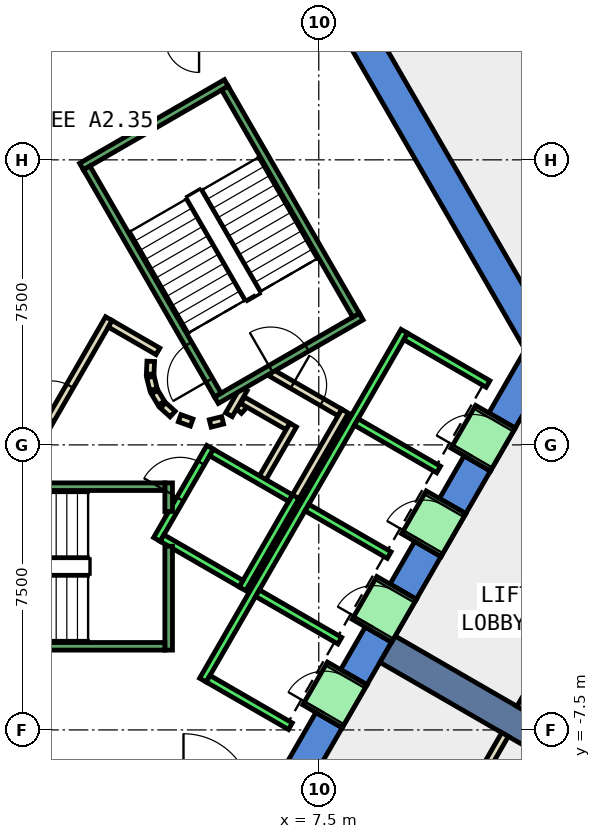
"""IFC4 building model, lengths in metres.
Left out: names, types, materials, properties, quantities, classifications, styles, units other than length and angle.
Written with IfcOpenShell. Run it as: python <this file> out.ifc"""

import sys

from ifc_helpers import new_model, si_unit, direction, frame, frame_2d, origin, place, context, subcontext, project, spatial, polyline, rectangle, outline, extrude, element, fill, save


model = new_model("IFC4")
c1 = context("Model", 3, precision=1e-05, world=origin(), true_north=direction((0.0, 1.0)))
c2 = subcontext(c1, "Body", "Model", "MODEL_VIEW")
j1 = project(units=[si_unit("LENGTHUNIT", "METRE"), si_unit("PLANEANGLEUNIT", "RADIAN")], contexts=[c1])
p1 = place(None, origin())
s1 = spatial("IfcSite", under=j1, at=p1, CompositionType="ELEMENT")
p2 = place(p1, origin())
s2 = spatial("IfcBuilding", under=s1, at=p2, CompositionType="ELEMENT")
p3 = place(p2, frame((0.0, 0.0, 171.8)))
s3 = spatial("IfcBuildingStorey", under=s2, at=p3, CompositionType="ELEMENT", Elevation=171.8)
p4 = place(p3, frame((0.0, 0.0, -0.4)))
e1 = element("IfcWall", 1, at=p4, inside=s3, PredefinedType="SHEAR", context=c2, shape_type="SweptSolid", body=[
    extrude(outline(polyline([(8.517, 11.748), (7.824, 11.348), (12.933, 2.5), (13.856, 2.5), (8.517, 11.748)])), origin(), (0.0, 0.0, 1.0), 4.2),
])
p5 = place(p3, frame((0.0, 0.0, -0.4)))
e2 = element("IfcWall", 2, at=p5, inside=s3, PredefinedType="SHEAR", context=c2, shape_type="SweptSolid", body=[
    extrude(outline(polyline([(8.117, -7.44), (7.424, -7.04), (6.466, -8.7), (6.928, -9.5), (8.117, -7.44)])), origin(), (0.0, 0.0, 1.0), 4.2),
])
p6 = place(p3, frame((0.0, 0.0, -0.4)))
e3 = element("IfcWall", 3, at=p6, inside=s3, PredefinedType="SHEAR", context=c2, shape_type="SweptSolid", body=[
    extrude(outline(polyline([(9.417, -5.189), (8.724, -4.789), (8.075, -5.914), (8.767, -6.314), (9.417, -5.189)])), origin(), (0.0, 0.0, 1.0), 4.2),
])
p7 = place(p3, frame((0.0, 0.0, -0.4)))
e4 = element("IfcWall", 4, at=p7, inside=s3, PredefinedType="SHEAR", context=c2, shape_type="SweptSolid", body=[
    extrude(outline(polyline([(10.717, -2.937), (10.025, -2.537), (9.374, -3.663), (10.067, -4.063), (10.717, -2.937)])), origin(), (0.0, 0.0, 1.0), 4.2),
])
p8 = place(p3, frame((0.0, 0.0, -0.4)))
e5 = element("IfcWall", 5, at=p8, inside=s3, PredefinedType="SHEAR", context=c2, shape_type="SweptSolid", body=[
    extrude(outline(polyline([(12.017, -0.686), (11.324, -0.286), (10.675, -1.411), (11.367, -1.811), (12.017, -0.686)])), origin(), (0.0, 0.0, 1.0), 4.2),
])
p9 = place(p3, frame((0.0, 0.0, -0.4)))
e6 = element("IfcWall", 6, at=p9, inside=s3, PredefinedType="SHEAR", context=c2, shape_type="SweptSolid", body=[
    extrude(outline(polyline([(11.974, 0.84), (12.667, 0.44), (13.856, 2.5), (12.933, 2.5), (11.974, 0.84)])), origin(), (0.0, 0.0, 1.0), 4.2),
])
p10 = place(p3, frame((0.0, 0.0, 3.6)))
e7 = element("IfcWall", 7, at=p10, inside=s3, PredefinedType="SHEAR", context=c2, shape_type="SweptSolid", body=[
    extrude(outline(polyline([(8.767, -6.314), (8.075, -5.914), (7.424, -7.04), (8.117, -7.44), (8.767, -6.314)])), origin(), (0.0, 0.0, 1.0), 0.2),
])
p11 = place(p3, frame((0.0, 0.0, 3.6)))
e8 = element("IfcWall", 8, at=p11, inside=s3, PredefinedType="SHEAR", context=c2, shape_type="SweptSolid", body=[
    extrude(outline(polyline([(10.067, -4.063), (9.374, -3.663), (8.724, -4.789), (9.417, -5.189), (10.067, -4.063)])), origin(), (0.0, 0.0, 1.0), 0.2),
])
p12 = place(p3, frame((0.0, 0.0, 3.6)))
e9 = element("IfcWall", 9, at=p12, inside=s3, PredefinedType="SHEAR", context=c2, shape_type="SweptSolid", body=[
    extrude(outline(polyline([(11.367, -1.811), (10.675, -1.411), (10.025, -2.537), (10.717, -2.937), (11.367, -1.811)])), origin(), (0.0, 0.0, 1.0), 0.2),
])
p13 = place(p3, frame((0.0, 0.0, 3.6)))
e10 = element("IfcWall", 10, at=p13, inside=s3, PredefinedType="SHEAR", context=c2, shape_type="SweptSolid", body=[
    extrude(outline(polyline([(12.667, 0.44), (11.974, 0.84), (11.324, -0.286), (12.017, -0.686), (12.667, 0.44)])), origin(), (0.0, 0.0, 1.0), 0.2),
])
p14 = place(p3, frame((9.31, -5.375, -0.4), z_axis=(0.0, 0.0, 1.0), x_axis=(0.866017533419, -0.500013631625, 0.0)))
e11 = element("IfcWall", 11, at=p14, inside=s3, PredefinedType="SHEAR", context=c2, shape_type="SweptSolid", body=[
    extrude(rectangle(XDim=9.0, YDim=0.8, at=frame_2d((4.5, 0.0))), origin(), (0.0, 0.0, 1.0), 4.2),
])
p15 = place(p3, frame((5.39, 0.898, 0.0), z_axis=(0.0, 0.0, 1.0), x_axis=(0.673828488714, 0.738887791073, 0.0)))
e12 = element("IfcWall", 12, at=p15, inside=s3, PredefinedType="PARTITIONING", context=c2, shape_type="SweptSolid", body=[
    extrude(rectangle(XDim=0.263, YDim=0.2, at=frame_2d((0.131, 0.0))), origin(), (0.0, 0.0, 1.0), 3.8),
])
p16 = place(p3, frame((5.499, 1.172, 0.0), z_axis=(0.0, 0.0, 1.0), x_axis=(0.866333505267, -0.499465972466, 0.0)))
e13 = element("IfcWall", 13, at=p16, inside=s3, PredefinedType="PARTITIONING", context=c2, shape_type="SweptSolid", body=[
    extrude(rectangle(XDim=1.374, YDim=0.2, at=frame_2d((0.687, 0.0))), origin(), (0.0, 0.0, 1.0), 3.8),
])
p17 = place(p3, frame((6.826, 0.522, 0.0), z_axis=(0.0, 0.0, 1.0), x_axis=(-0.500016722714, -0.866015748706, 0.0)))
e14 = element("IfcWall", 14, at=p17, inside=s3, PredefinedType="PARTITIONING", context=c2, shape_type="SweptSolid", body=[
    extrude(rectangle(XDim=1.7, YDim=0.2, at=frame_2d((0.85, 0.0))), origin(), (0.0, 0.0, 1.0), 3.8),
])
p18 = place(p3, frame((6.25, 1.894, 0.0), z_axis=(0.0, 0.0, 1.0), x_axis=(0.866043184279, -0.499969202016, 0.0)))
e15 = element("IfcWall", 15, at=p18, inside=s3, PredefinedType="PARTITIONING", context=c2, shape_type="SweptSolid", body=[
    extrude(rectangle(XDim=2.084, YDim=0.2, at=frame_2d((1.042, 0.0))), origin(), (0.0, 0.0, 1.0), 3.8),
])
p19 = place(p18, frame((0.642, 0.0, 0.0)))
e16 = element("IfcOpeningElement", 16, at=p19, cuts=e15, PredefinedType="OPENING", context=c2, shape_type="SweptSolid", body=[
    extrude(rectangle(XDim=0.9, YDim=2.1, at=frame_2d((0.45, 1.05))), frame((0.0, 0.11, 0.0), z_axis=(0.0, -1.0, 0.0), x_axis=(1.0, 0.0, 0.0)), (0.0, 0.0, 1.0), 0.22),
])
p20 = place(p3, frame((8.192, 0.888, 0.0), z_axis=(0.0, 0.0, 1.0), x_axis=(-0.499940625693, -0.866059680843, 0.0)))
e17 = element("IfcWall", 17, at=p20, inside=s3, PredefinedType="PARTITIONING", context=c2, shape_type="SweptSolid", body=[
    extrude(rectangle(XDim=2.68, YDim=0.2, at=frame_2d((1.34, 0.0))), origin(), (0.0, 0.0, 1.0), 3.8),
])
p21 = place(p3, frame((5.135, 0.793, 0.0), z_axis=(0.0, 0.0, 1.0), x_axis=(0.499526442893, 0.866298639529, 0.0)))
e18 = element("IfcWall", 18, at=p21, inside=s3, PredefinedType="PARTITIONING", context=c2, shape_type="SweptSolid", body=[
    extrude(rectangle(XDim=0.791, YDim=0.2, at=frame_2d((0.396, 0.0))), origin(), (0.0, 0.0, 1.0), 3.8),
])
p22 = place(p3, frame((-0.52, -1.0, 0.0), z_axis=(0.0, 0.0, 1.0), x_axis=(0.50011622646, 0.865958290007, 0.0)))
e19 = element("IfcWall", 19, at=p22, inside=s3, PredefinedType="PARTITIONING", context=c2, shape_type="SweptSolid", body=[
    extrude(rectangle(XDim=4.991, YDim=0.2, at=frame_2d((2.496, 0.0))), origin(), (0.0, 0.0, 1.0), 3.8),
])
p23 = place(p22, frame((1.945, 0.0, 0.0)))
e20 = element("IfcOpeningElement", 20, at=p23, cuts=e19, PredefinedType="OPENING", context=c2, shape_type="SweptSolid", body=[
    extrude(rectangle(XDim=1.0, YDim=2.1, at=frame_2d((0.5, 1.05))), frame((0.0, 0.11, 0.0), z_axis=(0.0, -1.0, 0.0), x_axis=(1.0, 0.0, 0.0)), (0.0, 0.0, 1.0), 0.22),
])
p24 = place(p3, frame((2.012, 3.186, 0.0), z_axis=(0.0, 0.0, 1.0), x_axis=(0.865891012941, -0.500232699559, 0.0)))
e21 = element("IfcWall", 21, at=p24, inside=s3, PredefinedType="PARTITIONING", context=c2, shape_type="SweptSolid", body=[
    extrude(rectangle(XDim=1.449, YDim=0.2, at=frame_2d((0.725, 0.0))), origin(), (0.0, 0.0, 1.0), 3.8),
])
p25 = place(p3, frame((3.079, 2.199, 0.0), z_axis=(0.0, 0.0, 1.0), x_axis=(-0.047771483479, -0.998858290933, 0.0)))
e22 = element("IfcWall", 22, at=p25, inside=s3, PredefinedType="PARTITIONING", context=c2, shape_type="SweptSolid", body=[
    extrude(rectangle(XDim=0.337, YDim=0.2, at=frame_2d((0.169, 0.0))), origin(), (0.0, 0.0, 1.0), 3.8),
])
p26 = place(p3, frame((3.07, 1.786, 0.0), z_axis=(0.0, 0.0, 1.0), x_axis=(0.242705583207, -0.970099994784, 0.0)))
e23 = element("IfcWall", 23, at=p26, inside=s3, PredefinedType="PARTITIONING", context=c2, shape_type="SweptSolid", body=[
    extrude(rectangle(XDim=0.338, YDim=0.2, at=frame_2d((0.169, 0.0))), origin(), (0.0, 0.0, 1.0), 3.8),
])
for number, where, z_axis, x_axis in (
    (24, (3.182, 1.388, 0.0), (0.0, 0.0, 1.0), (0.512, -0.859, 0.0)),
    (25, (3.404, 1.039, 0.0), (0.0, 0.0, 1.0), (0.74, -0.672, 0.0)),
):
    element("IfcWall", number, at=place(p3, frame(where, z_axis=z_axis, x_axis=x_axis)), inside=s3, PredefinedType="PARTITIONING", context=c2, shape_type="SweptSolid", body=[
        extrude(rectangle(XDim=0.338, YDim=0.2, at=frame_2d((0.169, 0.0))), origin(), (0.0, 0.0, 1.0), 3.8),
    ])
p27 = place(p3, frame((3.838, 0.702, 0.0), z_axis=(0.0, 0.0, 1.0), x_axis=(0.941035081519, -0.338308993895, 0.0)))
e26 = element("IfcWall", 26, at=p27, inside=s3, PredefinedType="PARTITIONING", context=c2, shape_type="SweptSolid", body=[
    extrude(rectangle(XDim=0.337, YDim=0.2, at=frame_2d((0.168, 0.0))), origin(), (0.0, 0.0, 1.0), 3.8),
])
p28 = place(p3, frame((4.644, 0.564, 0.0), z_axis=(0.0, 0.0, 1.0), x_axis=(0.969929076366, 0.243387729394, 0.0)))
e27 = element("IfcWall", 27, at=p28, inside=s3, PredefinedType="PARTITIONING", context=c2, shape_type="SweptSolid", body=[
    extrude(rectangle(XDim=0.337, YDim=0.2, at=frame_2d((0.168, 0.0))), origin(), (0.0, 0.0, 1.0), 3.8),
])
p29 = place(p3, frame((18.0, 2.077, 0.0), z_axis=(0.0, 0.0, 1.0), x_axis=(-0.499959557847, -0.866048751813, 0.0)))
e28 = element("IfcWall", 28, at=p29, inside=s3, PredefinedType="PARTITIONING", context=c2, shape_type="SweptSolid", body=[
    extrude(rectangle(XDim=10.399, YDim=0.2, at=frame_2d((5.199, 0.0))), origin(), (0.0, 0.0, 1.0), 3.8),
])
p30 = place(p3, frame((12.401, -7.621, 0.0), z_axis=(0.0, 0.0, 1.0), x_axis=(-0.499983724212, -0.866034800411, 0.0)))
e29 = element("IfcWall", 29, at=p30, inside=s3, PredefinedType="PARTITIONING", context=c2, shape_type="SweptSolid", body=[
    extrude(rectangle(XDim=9.302, YDim=0.2, at=frame_2d((4.651, 0.0))), origin(), (0.0, 0.0, 1.0), 3.8),
])
p31 = place(p3, frame((3.24, -2.488, 0.0), z_axis=(0.0, 0.0, 1.0), x_axis=(0.49994636267, 0.866056369097, 0.0)))
e30 = element("IfcWall", 30, at=p31, inside=s3, PredefinedType="STANDARD", context=c2, shape_type="SweptSolid", body=[
    extrude(rectangle(XDim=2.8, YDim=0.2, at=frame_2d((1.4, 0.0))), origin(), (0.0, 0.0, 1.0), 3.8),
])
p32 = place(p31, frame((1.225, 0.0, 0.0)))
e31 = element("IfcOpeningElement", 31, at=p32, cuts=e30, PredefinedType="OPENING", context=c2, shape_type="SweptSolid", body=[
    extrude(rectangle(XDim=1.1, YDim=2.1, at=frame_2d((0.55, 1.05))), frame((0.0, 0.11, 0.0), z_axis=(0.0, -1.0, 0.0), x_axis=(1.0, 0.0, 0.0)), (0.0, 0.0, 1.0), 0.22),
])
p33 = place(p3, frame((5.492, -3.788, 0.0), z_axis=(0.0, 0.0, 1.0), x_axis=(0.500011755427, 0.866018616679, 0.0)))
e32 = element("IfcWall", 32, at=p33, inside=s3, PredefinedType="STANDARD", context=c2, shape_type="SweptSolid", body=[
    extrude(rectangle(XDim=2.8, YDim=0.2, at=frame_2d((1.4, 0.0))), origin(), (0.0, 0.0, 1.0), 3.8),
])
p34 = place(p3, frame((3.377, -2.452, 0.0), z_axis=(0.0, 0.0, 1.0), x_axis=(0.865955154139, -0.50012165622, 0.0)))
e33 = element("IfcWall", 33, at=p34, inside=s3, PredefinedType="STANDARD", context=c2, shape_type="SweptSolid", body=[
    extrude(rectangle(XDim=2.4, YDim=0.2, at=frame_2d((1.2, 0.0))), origin(), (0.0, 0.0, 1.0), 3.8),
])
p35 = place(p3, frame((4.677, -0.2, 0.0), z_axis=(0.0, 0.0, 1.0), x_axis=(0.865973769406, -0.500089422704, 0.0)))
e34 = element("IfcWall", 34, at=p35, inside=s3, PredefinedType="STANDARD", context=c2, shape_type="SweptSolid", body=[
    extrude(rectangle(XDim=2.399, YDim=0.2, at=frame_2d((1.2, 0.0))), origin(), (0.0, 0.0, 1.0), 3.8),
])
p36 = place(p3, frame((4.451, -6.19, 0.0), z_axis=(0.0, 0.0, 1.0), x_axis=(0.50000090737, 0.866024879913, 0.0)))
e35 = element("IfcWall", 35, at=p36, inside=s3, PredefinedType="STANDARD", context=c2, shape_type="SweptSolid", body=[
    extrude(rectangle(XDim=10.6, YDim=0.2, at=frame_2d((5.3, 0.0))), origin(), (0.0, 0.0, 1.0), 3.8),
])
for number, where, z_axis, x_axis in (
    (36, (4.588, -6.153, 0.0), (0.0, 0.0, 1.0), (0.866, -0.5, 0.0)),
    (37, (5.888, -3.902, 0.0), (0.0, 0.0, 1.0), (0.866, -0.5, 0.0)),
    (38, (7.188, -1.65, 0.0), (0.0, 0.0, 1.0), (0.866, -0.5, 0.0)),
    (39, (8.488, 0.602, 0.0), (0.0, 0.0, 1.0), (0.866, -0.5, 0.0)),
):
    element("IfcWall", number, at=place(p3, frame(where, z_axis=z_axis, x_axis=x_axis)), inside=s3, PredefinedType="STANDARD", context=c2, shape_type="SweptSolid", body=[
        extrude(rectangle(XDim=2.5, YDim=0.2, at=frame_2d((1.25, 0.0))), origin(), (0.0, 0.0, 1.0), 3.8),
    ])
p37 = place(p3, frame((9.788, 2.853, 0.0), z_axis=(0.0, 0.0, 1.0), x_axis=(0.865998541277, -0.500046524342, 0.0)))
e40 = element("IfcWall", 40, at=p37, inside=s3, PredefinedType="STANDARD", context=c2, shape_type="SweptSolid", body=[
    extrude(rectangle(XDim=2.5, YDim=0.2, at=frame_2d((1.25, 0.0))), origin(), (0.0, 0.0, 1.0), 3.8),
])
p38 = place(p3, frame((7.598, -7.14, 0.0), z_axis=(0.0, 0.0, 1.0), x_axis=(0.500362116554, 0.865816234728, 0.0)))
e41 = element("IfcWall", 41, at=p38, inside=s3, PredefinedType="STANDARD", context=c2, shape_type="SweptSolid", body=[
    extrude(rectangle(XDim=1.299, YDim=1.2, at=frame_2d((0.65, 0.0))), origin(), (0.0, 0.0, 1.0), 2.4),
])
p39 = place(p38, frame((0.1, 0.0, 0.0)))
e42 = element("IfcOpeningElement", 42, at=p39, cuts=e41, PredefinedType="OPENING", context=c2, shape_type="SweptSolid", body=[
    extrude(rectangle(XDim=1.1, YDim=2.3, at=frame_2d((0.55, 1.15))), frame((0.0, 0.61, 0.0), z_axis=(0.0, -1.0, 0.0), x_axis=(1.0, 0.0, 0.0)), (0.0, 0.0, 1.0), 1.22),
])
p40 = place(p3, frame((8.898, -4.889, 0.0), z_axis=(0.0, 0.0, 1.0), x_axis=(0.500036693733, 0.866004217611, 0.0)))
e43 = element("IfcWall", 43, at=p40, inside=s3, PredefinedType="STANDARD", context=c2, shape_type="SweptSolid", body=[
    extrude(rectangle(XDim=1.3, YDim=1.2, at=frame_2d((0.65, 0.0))), origin(), (0.0, 0.0, 1.0), 2.4),
])
p41 = place(p40, frame((0.1, 0.0, 0.0)))
e44 = element("IfcOpeningElement", 44, at=p41, cuts=e43, PredefinedType="OPENING", context=c2, shape_type="SweptSolid", body=[
    extrude(rectangle(XDim=1.1, YDim=2.3, at=frame_2d((0.55, 1.15))), frame((0.0, 0.61, 0.0), z_axis=(0.0, -1.0, 0.0), x_axis=(1.0, 0.0, 0.0)), (0.0, 0.0, 1.0), 1.22),
])
p42 = place(p3, frame((10.198, -2.637, 0.0), z_axis=(0.0, 0.0, 1.0), x_axis=(0.49989585183, 0.866085525409, 0.0)))
e45 = element("IfcWall", 45, at=p42, inside=s3, PredefinedType="STANDARD", context=c2, shape_type="SweptSolid", body=[
    extrude(rectangle(XDim=1.3, YDim=1.2, at=frame_2d((0.65, 0.0))), origin(), (0.0, 0.0, 1.0), 2.4),
])
p43 = place(p42, frame((0.1, 0.0, 0.0)))
e46 = element("IfcOpeningElement", 46, at=p43, cuts=e45, PredefinedType="OPENING", context=c2, shape_type="SweptSolid", body=[
    extrude(rectangle(XDim=1.1, YDim=2.3, at=frame_2d((0.55, 1.15))), frame((0.0, 0.61, 0.0), z_axis=(0.0, -1.0, 0.0), x_axis=(1.0, 0.0, 0.0)), (0.0, 0.0, 1.0), 1.22),
])
p44 = place(p3, frame((11.498, -0.385, 0.0), z_axis=(0.0, 0.0, 1.0), x_axis=(0.500221244143, 0.865897630733, 0.0)))
e47 = element("IfcWall", 47, at=p44, inside=s3, PredefinedType="STANDARD", context=c2, shape_type="SweptSolid", body=[
    extrude(rectangle(XDim=1.299, YDim=1.2, at=frame_2d((0.65, 0.0))), origin(), (0.0, 0.0, 1.0), 2.4),
])
p45 = place(p44, frame((0.1, 0.0, 0.0)))
e48 = element("IfcOpeningElement", 48, at=p45, cuts=e47, PredefinedType="OPENING", context=c2, shape_type="SweptSolid", body=[
    extrude(rectangle(XDim=1.1, YDim=2.3, at=frame_2d((0.55, 1.15))), frame((0.0, 0.61, 0.0), z_axis=(0.0, -1.0, 0.0), x_axis=(1.0, 0.0, 0.0)), (0.0, 0.0, 1.0), 1.22),
])
p46 = place(p3, frame((3.55, -2.667, 0.0), z_axis=(0.0, 0.0, 1.0), x_axis=(0.0, -1.0, 0.0)))
e49 = element("IfcWall", 49, at=p46, inside=s3, PredefinedType="STANDARD", context=c2, shape_type="SweptSolid", body=[
    extrude(rectangle(XDim=2.733, YDim=0.2, at=frame_2d((1.366, 0.0))), origin(), (0.0, 0.0, 1.0), 3.8),
])
p47 = place(p3, frame((3.55, -1.0, 0.0), z_axis=(0.0, 0.0, 1.0), x_axis=(0.0, -1.0, 0.0)))
e50 = element("IfcWall", 50, at=p47, inside=s3, PredefinedType="STANDARD", context=c2, shape_type="SweptSolid", body=[
    extrude(rectangle(XDim=0.751, YDim=0.2, at=frame_2d((0.375, 0.0))), origin(), (0.0, 0.0, 1.0), 3.8),
])
p48 = place(p3, frame((-3.45, -1.1, 0.0), z_axis=(0.0, 0.0, 1.0), x_axis=(1.0, 0.0, 0.0)))
e51 = element("IfcWall", 51, at=p48, inside=s3, PredefinedType="STANDARD", context=c2, shape_type="SweptSolid", body=[
    extrude(rectangle(XDim=6.9, YDim=0.2, at=frame_2d((3.45, 0.0))), origin(), (0.0, 0.0, 1.0), 3.8),
])
p49 = place(p48, frame((0.45, 0.0, 0.0)))
e52 = element("IfcOpeningElement", 52, at=p49, cuts=e51, PredefinedType="OPENING", context=c2, shape_type="SweptSolid", body=[
    extrude(rectangle(XDim=1.1, YDim=2.2, at=frame_2d((0.55, 1.1))), frame((0.0, 0.11, 0.0), z_axis=(0.0, -1.0, 0.0), x_axis=(1.0, 0.0, 0.0)), (0.0, 0.0, 1.0), 0.22),
])
p50 = place(p3, frame((-3.45, -5.3, 0.0), z_axis=(0.0, 0.0, 1.0), x_axis=(1.0, 0.0, 0.0)))
e53 = element("IfcWall", 53, at=p50, inside=s3, PredefinedType="STANDARD", context=c2, shape_type="SweptSolid", body=[
    extrude(rectangle(XDim=6.9, YDim=0.2, at=frame_2d((3.45, 0.0))), origin(), (0.0, 0.0, 1.0), 3.8),
])
p51 = place(p3, frame((4.806, 1.176, 0.0), z_axis=(0.0, 0.0, 1.0), x_axis=(0.866059941101, 0.499940174841, 0.0)))
e54 = element("IfcWall", 54, at=p51, inside=s3, PredefinedType="STANDARD", context=c2, shape_type="SweptSolid", body=[
    extrude(rectangle(XDim=4.4, YDim=0.2, at=frame_2d((2.2, 0.0))), origin(), (0.0, 0.0, 1.0), 3.8),
])
p52 = place(p51, frame((1.65, 0.0, 0.0)))
e55 = element("IfcOpeningElement", 55, at=p52, cuts=e54, PredefinedType="OPENING", context=c2, shape_type="SweptSolid", body=[
    extrude(rectangle(XDim=1.1, YDim=2.2, at=frame_2d((0.55, 1.1))), frame((0.0, 0.11, 0.0), z_axis=(0.0, -1.0, 0.0), x_axis=(1.0, 0.0, 0.0)), (0.0, 0.0, 1.0), 0.22),
])
p53 = place(p3, frame((1.256, 7.324, 0.0), z_axis=(0.0, 0.0, 1.0), x_axis=(0.866046073146, 0.499964197906, 0.0)))
e56 = element("IfcWall", 56, at=p53, inside=s3, PredefinedType="STANDARD", context=c2, shape_type="SweptSolid", body=[
    extrude(rectangle(XDim=4.4, YDim=0.2, at=frame_2d((2.2, 0.0))), origin(), (0.0, 0.0, 1.0), 3.8),
])
p54 = place(p3, frame((4.843, 1.312, 0.0), z_axis=(0.0, 0.0, 1.0), x_axis=(-0.499963383562, 0.866046543262, 0.0)))
e57 = element("IfcWall", 57, at=p54, inside=s3, PredefinedType="STANDARD", context=c2, shape_type="SweptSolid", body=[
    extrude(rectangle(XDim=6.9, YDim=0.2, at=frame_2d((3.45, 0.0))), origin(), (0.0, 0.0, 1.0), 3.8),
])
p55 = place(p54, frame((0.45, 0.0, 0.0)))
e58 = element("IfcOpeningElement", 58, at=p55, cuts=e57, PredefinedType="OPENING", context=c2, shape_type="SweptSolid", body=[
    extrude(rectangle(XDim=1.1, YDim=2.2, at=frame_2d((0.55, 1.1))), frame((0.0, 0.11, 0.0), z_axis=(0.0, -1.0, 0.0), x_axis=(1.0, 0.0, 0.0)), (0.0, 0.0, 1.0), 0.22),
])
p56 = place(p3, frame((8.48, 3.412, 0.0), z_axis=(0.0, 0.0, 1.0), x_axis=(-0.499978703459, 0.866037698999, 0.0)))
e59 = element("IfcWall", 59, at=p56, inside=s3, PredefinedType="STANDARD", context=c2, shape_type="SweptSolid", body=[
    extrude(rectangle(XDim=6.9, YDim=0.2, at=frame_2d((3.45, 0.0))), origin(), (0.0, 0.0, 1.0), 3.8),
])
p57 = place(p23, origin())
e60 = element("IfcDoor", 60, at=p57, inside=s3, OperationType="SINGLE_SWING_LEFT", PredefinedType="DOOR", context=c2, shape_type="SweptSolid", body=[
    extrude(rectangle(XDim=1.0, YDim=2.1, at=frame_2d((0.5, 1.05))), frame((0.0, 0.025, 0.0), z_axis=(0.0, -1.0, 0.0), x_axis=(1.0, 0.0, 0.0)), (0.0, 0.0, 1.0), 0.05),
])
fill(e20, e60)
p58 = place(p19, origin())
e61 = element("IfcDoor", 61, at=p58, inside=s3, OperationType="SINGLE_SWING_LEFT", PredefinedType="DOOR", context=c2, shape_type="SweptSolid", body=[
    extrude(rectangle(XDim=0.9, YDim=2.1, at=frame_2d((0.45, 1.05))), frame((0.0, 0.025, 0.0), z_axis=(0.0, -1.0, 0.0), x_axis=(1.0, 0.0, 0.0)), (0.0, 0.0, 1.0), 0.05),
])
fill(e16, e61)
p59 = place(p39, origin())
e62 = element("IfcDoor", 62, at=p59, inside=s3, OperationType="SLIDING_TO_LEFT", PredefinedType="DOOR", context=c2, shape_type="SweptSolid", body=[
    extrude(rectangle(XDim=1.1, YDim=2.3, at=frame_2d((0.55, 1.15))), frame((0.0, 0.025, 0.0), z_axis=(0.0, -1.0, 0.0), x_axis=(1.0, 0.0, 0.0)), (0.0, 0.0, 1.0), 0.05),
])
fill(e42, e62)
p60 = place(p41, origin())
e63 = element("IfcDoor", 63, at=p60, inside=s3, OperationType="SLIDING_TO_LEFT", PredefinedType="DOOR", context=c2, shape_type="SweptSolid", body=[
    extrude(rectangle(XDim=1.1, YDim=2.3, at=frame_2d((0.55, 1.15))), frame((0.0, 0.025, 0.0), z_axis=(0.0, -1.0, 0.0), x_axis=(1.0, 0.0, 0.0)), (0.0, 0.0, 1.0), 0.05),
])
fill(e44, e63)
p61 = place(p43, origin())
e64 = element("IfcDoor", 64, at=p61, inside=s3, OperationType="SLIDING_TO_LEFT", PredefinedType="DOOR", context=c2, shape_type="SweptSolid", body=[
    extrude(rectangle(XDim=1.1, YDim=2.3, at=frame_2d((0.55, 1.15))), frame((0.0, 0.025, 0.0), z_axis=(0.0, -1.0, 0.0), x_axis=(1.0, 0.0, 0.0)), (0.0, 0.0, 1.0), 0.05),
])
fill(e46, e64)
p62 = place(p45, origin())
e65 = element("IfcDoor", 65, at=p62, inside=s3, OperationType="SLIDING_TO_LEFT", PredefinedType="DOOR", context=c2, shape_type="SweptSolid", body=[
    extrude(rectangle(XDim=1.1, YDim=2.3, at=frame_2d((0.55, 1.15))), frame((0.0, 0.025, 0.0), z_axis=(0.0, -1.0, 0.0), x_axis=(1.0, 0.0, 0.0)), (0.0, 0.0, 1.0), 0.05),
])
fill(e48, e65)
p63 = place(p32, origin())
e66 = element("IfcDoor", 66, at=p63, inside=s3, OperationType="SLIDING_TO_LEFT", PredefinedType="DOOR", context=c2, shape_type="SweptSolid", body=[
    extrude(rectangle(XDim=1.1, YDim=2.1, at=frame_2d((0.55, 1.05))), frame((0.0, 0.025, 0.0), z_axis=(0.0, -1.0, 0.0), x_axis=(1.0, 0.0, 0.0)), (0.0, 0.0, 1.0), 0.05),
])
fill(e31, e66)
p64 = place(p55, origin())
e67 = element("IfcDoor", 67, at=p64, inside=s3, OperationType="SINGLE_SWING_LEFT", PredefinedType="DOOR", context=c2, shape_type="SweptSolid", body=[
    extrude(rectangle(XDim=1.1, YDim=2.2, at=frame_2d((0.55, 1.1))), frame((0.0, 0.025, 0.0), z_axis=(0.0, -1.0, 0.0), x_axis=(1.0, 0.0, 0.0)), (0.0, 0.0, 1.0), 0.05),
])
fill(e58, e67)
p65 = place(p52, origin())
e68 = element("IfcDoor", 68, at=p65, inside=s3, OperationType="SINGLE_SWING_LEFT", PredefinedType="DOOR", context=c2, shape_type="SweptSolid", body=[
    extrude(rectangle(XDim=1.1, YDim=2.2, at=frame_2d((0.55, 1.1))), frame((0.0, 0.025, 0.0), z_axis=(0.0, -1.0, 0.0), x_axis=(1.0, 0.0, 0.0)), (0.0, 0.0, 1.0), 0.05),
])
fill(e55, e68)
save(model, sys.argv[1])
